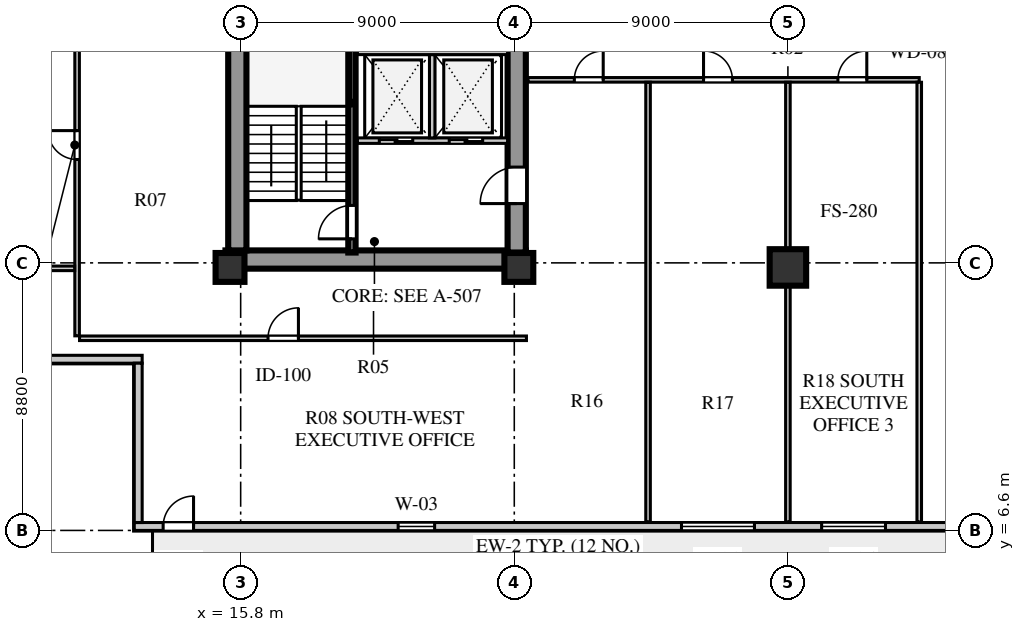
"""IFC4 building model, lengths in metres.
Left out: names, types, materials, properties, quantities, classifications, styles, units other than length and angle.
Written with IfcOpenShell. Run it as: python <this file> out.ifc"""

import sys

from ifc_helpers import new_model, si_unit, direction, frame, frame_2d, origin, origin_2d, place, context, subcontext, project, spatial, rectangle, extrude, element, fill, save


model = new_model("IFC4")
c1 = context("Model", 3, precision=1e-05, world=origin(), true_north=direction((0.0, 1.0)))
c2 = subcontext(c1, "Body", "Model", "MODEL_VIEW")
j1 = project(units=[si_unit("LENGTHUNIT", "METRE"), si_unit("PLANEANGLEUNIT", "RADIAN")], contexts=[c1])
p1 = place(None, origin())
s1 = spatial("IfcSite", under=j1, at=p1, CompositionType="ELEMENT")
p2 = place(p1, origin())
s2 = spatial("IfcBuilding", under=s1, at=p2, CompositionType="ELEMENT")
p3 = place(p2, frame((0.0, 0.0, 50.0)))
s3 = spatial("IfcBuildingStorey", under=s2, at=p3, CompositionType="ELEMENT", Elevation=50.0)
p4 = place(p3, frame((15.3, 15.51, 0.0), z_axis=(0.0, 0.0, 1.0), x_axis=(1.0, 0.0, 0.0)))
e1 = element("IfcWall", 1, at=p4, inside=s3, PredefinedType="SHEAR", context=c2, shape_type="SweptSolid", body=[
    extrude(rectangle(XDim=9.88, YDim=0.6, at=frame_2d((4.94, 0.0))), origin(), (0.0, 0.0, 1.0), 3.72),
])
p5 = place(p3, frame((15.69, 15.81, 0.0), z_axis=(0.0, 0.0, 1.0), x_axis=(0.0, 1.0, 0.0)))
e2 = element("IfcWall", 2, at=p5, inside=s3, PredefinedType="SHEAR", context=c2, shape_type="SweptSolid", body=[
    extrude(rectangle(XDim=25.63, YDim=0.6, at=frame_2d((12.815, 0.0))), origin(), (0.0, 0.0, 1.0), 3.72),
])
p6 = place(p3, frame((24.88, 15.74, 0.0), z_axis=(0.0, 0.0, 1.0), x_axis=(0.0, 1.0, 0.0)))
e3 = element("IfcWall", 3, at=p6, inside=s3, PredefinedType="SHEAR", context=c2, shape_type="SweptSolid", body=[
    extrude(rectangle(XDim=25.76, YDim=0.6, at=frame_2d((12.88, 0.0))), origin(), (0.0, 0.0, 1.0), 3.72),
])
p7 = place(p6, frame((1.61, 0.0, 0.0)))
e4 = element("IfcOpeningElement", 4, at=p7, cuts=e3, PredefinedType="OPENING", context=c2, shape_type="SweptSolid", body=[
    extrude(rectangle(XDim=1.2, YDim=2.1, at=frame_2d((0.6, 1.05))), frame((0.0, 0.31, 0.0), z_axis=(0.0, -1.0, 0.0), x_axis=(1.0, 0.0, 0.0)), (0.0, 0.0, 1.0), 0.62),
])
p8 = place(p6, frame((6.78, 0.0, 0.0)))
e5 = element("IfcOpeningElement", 5, at=p8, cuts=e3, PredefinedType="OPENING", context=c2, shape_type="SweptSolid", body=[
    extrude(rectangle(XDim=0.85, YDim=2.06, at=frame_2d((0.425, 1.03))), frame((0.0, 0.31, 0.0), z_axis=(0.0, -1.0, 0.0), x_axis=(1.0, 0.0, 0.0)), (0.0, 0.0, 1.0), 0.62),
])
p9 = place(p6, frame((12.11, 0.0, 0.0)))
e6 = element("IfcOpeningElement", 6, at=p9, cuts=e3, PredefinedType="OPENING", context=c2, shape_type="SweptSolid", body=[
    extrude(rectangle(XDim=1.5, YDim=2.12, at=frame_2d((0.75, 1.06))), frame((0.0, 0.31, 0.0), z_axis=(0.0, -1.0, 0.0), x_axis=(1.0, 0.0, 0.0)), (0.0, 0.0, 1.0), 0.62),
])
p10 = place(p6, frame((20.11, 0.0, 0.0)))
e7 = element("IfcOpeningElement", 7, at=p10, cuts=e3, PredefinedType="OPENING", context=c2, shape_type="SweptSolid", body=[
    extrude(rectangle(XDim=1.2, YDim=2.12, at=frame_2d((0.6, 1.06))), frame((0.0, 0.31, 0.0), z_axis=(0.0, -1.0, 0.0), x_axis=(1.0, 0.0, 0.0)), (0.0, 0.0, 1.0), 0.62),
])
p11 = place(p6, frame((24.01, 0.0, 0.0)))
e8 = element("IfcOpeningElement", 8, at=p11, cuts=e3, PredefinedType="OPENING", context=c2, shape_type="SweptSolid", body=[
    extrude(rectangle(XDim=0.95, YDim=2.1, at=frame_2d((0.475, 1.05))), frame((0.0, 0.31, 0.0), z_axis=(0.0, -1.0, 0.0), x_axis=(1.0, 0.0, 0.0)), (0.0, 0.0, 1.0), 0.62),
])
for number, where, z_axis, x_axis in (
    (9, (15.45, 15.25, 0.0), (0.0, 0.0, 1.0), (1.0, 0.0, 0.0)),
    (10, (24.95, 15.25, 0.0), (0.0, 0.0, 1.0), (1.0, 0.0, 0.0)),
):
    element("IfcColumn", number, at=place(p3, frame(where, z_axis=z_axis, x_axis=x_axis)), inside=s3, PredefinedType="COLUMN", context=c2, shape_type="SweptSolid", body=[
        extrude(rectangle(XDim=0.95, YDim=0.95, at=origin_2d()), origin(), (0.0, 0.0, 1.0), 3.72),
    ])
p12 = place(p3, frame((33.8, 15.25, 0.0), z_axis=(0.0, 0.0, 1.0), x_axis=(1.0, 0.0, 0.0)))
e11 = element("IfcColumn", 11, at=p12, inside=s3, PredefinedType="COLUMN", context=c2, shape_type="SweptSolid", body=[
    extrude(rectangle(XDim=1.2, YDim=1.2, at=origin_2d()), origin(), (0.0, 0.0, 1.0), 3.72),
])
p13 = place(p3, frame((12.3, 6.73, 0.0), z_axis=(0.0, 0.0, 1.0), x_axis=(1.0, 0.0, 0.0)))
e12 = element("IfcWall", 12, at=p13, inside=s3, PredefinedType="SOLIDWALL", context=c2, shape_type="SweptSolid", body=[
    extrude(rectangle(XDim=34.0, YDim=0.26, at=frame_2d((17.0, 0.0))), origin(), (0.0, 0.0, 1.0), 3.72),
])
p14 = place(p13, frame((0.95, 0.0, 0.0)))
e13 = element("IfcOpeningElement", 13, at=p14, cuts=e12, PredefinedType="OPENING", context=c2, shape_type="SweptSolid", body=[
    extrude(rectangle(XDim=1.0, YDim=2.05, at=frame_2d((0.5, 1.025))), frame((0.0, 0.14, 0.0), z_axis=(0.0, -1.0, 0.0), x_axis=(1.0, 0.0, 0.0)), (0.0, 0.0, 1.0), 0.28),
])
p15 = place(p13, frame((8.68, 0.0, 0.8)))
e14 = element("IfcOpeningElement", 14, at=p15, cuts=e12, PredefinedType="OPENING", context=c2, shape_type="SweptSolid", body=[
    extrude(rectangle(XDim=1.2, YDim=1.75, at=frame_2d((0.6, 0.875))), frame((0.0, 0.14, 0.0), z_axis=(0.0, -1.0, 0.0), x_axis=(1.0, 0.0, 0.0)), (0.0, 0.0, 1.0), 0.28),
])
p16 = place(p13, frame((18.0, 0.0, 0.8)))
e15 = element("IfcOpeningElement", 15, at=p16, cuts=e12, PredefinedType="OPENING", context=c2, shape_type="SweptSolid", body=[
    extrude(rectangle(XDim=2.4, YDim=2.05, at=frame_2d((1.2, 1.025))), frame((0.0, 0.14, 0.0), z_axis=(0.0, -1.0, 0.0), x_axis=(1.0, 0.0, 0.0)), (0.0, 0.0, 1.0), 0.28),
])
p17 = place(p13, frame((22.61, 0.0, 0.8)))
e16 = element("IfcOpeningElement", 16, at=p17, cuts=e12, PredefinedType="OPENING", context=c2, shape_type="SweptSolid", body=[
    extrude(rectangle(XDim=2.1, YDim=1.95, at=frame_2d((1.05, 0.975))), frame((0.0, 0.14, 0.0), z_axis=(0.0, -1.0, 0.0), x_axis=(1.0, 0.0, 0.0)), (0.0, 0.0, 1.0), 0.28),
])
p18 = place(p13, frame((29.18, 0.0, 0.8)))
e17 = element("IfcOpeningElement", 17, at=p18, cuts=e12, PredefinedType="OPENING", context=c2, shape_type="SweptSolid", body=[
    extrude(rectangle(XDim=1.35, YDim=1.9, at=frame_2d((0.675, 0.95))), frame((0.0, 0.14, 0.0), z_axis=(0.0, -1.0, 0.0), x_axis=(1.0, 0.0, 0.0)), (0.0, 0.0, 1.0), 0.28),
])
p19 = place(p3, frame((6.8, 12.23, 0.0), z_axis=(0.0, 0.0, 1.0), x_axis=(1.0, 0.0, 0.0)))
e18 = element("IfcWall", 18, at=p19, inside=s3, PredefinedType="SOLIDWALL", context=c2, shape_type="SweptSolid", body=[
    extrude(rectangle(XDim=5.76, YDim=0.26, at=frame_2d((2.88, 0.0))), origin(), (0.0, 0.0, 1.0), 3.72),
])
p20 = place(p3, frame((12.43, 12.1, 0.0), z_axis=(0.0, 0.0, 1.0), x_axis=(0.0, -1.0, 0.0)))
e19 = element("IfcWall", 19, at=p20, inside=s3, PredefinedType="SOLIDWALL", context=c2, shape_type="SweptSolid", body=[
    extrude(rectangle(XDim=5.24, YDim=0.26, at=frame_2d((2.62, 0.0))), origin(), (0.0, 0.0, 1.0), 3.72),
])
p21 = place(p3, frame((19.46, 15.74, 0.0), z_axis=(0.0, 0.0, 1.0), x_axis=(0.0, 1.0, 0.0)))
e20 = element("IfcWall", 20, at=p21, inside=s3, PredefinedType="SHEAR", context=c2, shape_type="SweptSolid", body=[
    extrude(rectangle(XDim=8.2, YDim=0.24, at=frame_2d((4.1, 0.0))), origin(), (0.0, 0.0, 1.0), 4.0),
])
p22 = place(p21, frame((0.45, 0.0, 0.0)))
e21 = element("IfcOpeningElement", 21, at=p22, cuts=e20, PredefinedType="OPENING", context=c2, shape_type="SweptSolid", body=[
    extrude(rectangle(XDim=1.1, YDim=2.1, at=frame_2d((0.55, 1.05))), frame((0.0, 0.13, 0.0), z_axis=(0.0, -1.0, 0.0), x_axis=(1.0, 0.0, 0.0)), (0.0, 0.0, 1.0), 0.26),
])
p23 = place(p3, frame((19.64, 19.42, 0.0), z_axis=(0.0, 0.0, 1.0), x_axis=(1.0, 0.0, 0.0)))
e22 = element("IfcWall", 22, at=p23, inside=s3, PredefinedType="SOLIDWALL", context=c2, shape_type="SweptSolid", body=[
    extrude(rectangle(XDim=4.94, YDim=0.18, at=frame_2d((2.47, 0.0))), origin(), (0.0, 0.0, 1.0), 3.72),
])
p24 = place(p23, frame((0.72, 0.0, 0.0)))
e23 = element("IfcOpeningElement", 23, at=p24, cuts=e22, PredefinedType="OPENING", context=c2, shape_type="SweptSolid", body=[
    extrude(rectangle(XDim=1.1, YDim=2.1, at=frame_2d((0.55, 1.05))), frame((0.0, 0.1, 0.0), z_axis=(0.0, -1.0, 0.0), x_axis=(1.0, 0.0, 0.0)), (0.0, 0.0, 1.0), 0.2),
])
p25 = place(p23, frame((3.02, 0.0, 0.0)))
e24 = element("IfcOpeningElement", 24, at=p25, cuts=e22, PredefinedType="OPENING", context=c2, shape_type="SweptSolid", body=[
    extrude(rectangle(XDim=1.1, YDim=2.1, at=frame_2d((0.55, 1.05))), frame((0.0, 0.1, 0.0), z_axis=(0.0, -1.0, 0.0), x_axis=(1.0, 0.0, 0.0)), (0.0, 0.0, 1.0), 0.2),
])
p26 = place(p3, frame((22.1, 19.51, 0.0), z_axis=(0.0, 0.0, 1.0), x_axis=(0.0, 1.0, 0.0)))
e25 = element("IfcWall", 25, at=p26, inside=s3, PredefinedType="SOLIDWALL", context=c2, shape_type="SweptSolid", body=[
    extrude(rectangle(XDim=2.74, YDim=0.18, at=frame_2d((1.37, 0.0))), origin(), (0.0, 0.0, 1.0), 3.72),
])
p27 = place(p3, frame((19.64, 22.34, 0.0), z_axis=(0.0, 0.0, 1.0), x_axis=(1.0, 0.0, 0.0)))
e26 = element("IfcWall", 26, at=p27, inside=s3, PredefinedType="SOLIDWALL", context=c2, shape_type="SweptSolid", body=[
    extrude(rectangle(XDim=4.94, YDim=0.18, at=frame_2d((2.47, 0.0))), origin(), (0.0, 0.0, 1.0), 3.72),
])
p28 = place(p3, frame((25.25, 21.42, 0.0), z_axis=(0.0, 0.0, 1.0), x_axis=(1.0, 0.0, 0.0)))
e27 = element("IfcWall", 27, at=p28, inside=s3, PredefinedType="PARTITIONING", context=c2, shape_type="SweptSolid", body=[
    extrude(rectangle(XDim=12.87, YDim=0.15, at=frame_2d((6.435, 0.0))), origin(), (0.0, 0.0, 1.0), 3.32),
])
p29 = place(p28, frame((1.525, 0.0, 0.0)))
e28 = element("IfcOpeningElement", 28, at=p29, cuts=e27, PredefinedType="OPENING", context=c2, shape_type="SweptSolid", body=[
    extrude(rectangle(XDim=0.95, YDim=2.08, at=frame_2d((0.475, 1.04))), frame((0.0, 0.085, 0.0), z_axis=(0.0, -1.0, 0.0), x_axis=(1.0, 0.0, 0.0)), (0.0, 0.0, 1.0), 0.17),
])
p30 = place(p28, frame((5.775, 0.0, 0.0)))
e29 = element("IfcOpeningElement", 29, at=p30, cuts=e27, PredefinedType="OPENING", context=c2, shape_type="SweptSolid", body=[
    extrude(rectangle(XDim=0.95, YDim=2.08, at=frame_2d((0.475, 1.04))), frame((0.0, 0.085, 0.0), z_axis=(0.0, -1.0, 0.0), x_axis=(1.0, 0.0, 0.0)), (0.0, 0.0, 1.0), 0.17),
])
p31 = place(p28, frame((10.195, 0.0, 0.0)))
e30 = element("IfcOpeningElement", 30, at=p31, cuts=e27, PredefinedType="OPENING", context=c2, shape_type="SweptSolid", body=[
    extrude(rectangle(XDim=0.95, YDim=2.08, at=frame_2d((0.475, 1.04))), frame((0.0, 0.085, 0.0), z_axis=(0.0, -1.0, 0.0), x_axis=(1.0, 0.0, 0.0)), (0.0, 0.0, 1.0), 0.17),
])
p32 = place(p3, frame((38.12, 6.88, 0.0), z_axis=(0.0, 0.0, 1.0), x_axis=(0.0, 1.0, 0.0)))
e31 = element("IfcWall", 31, at=p32, inside=s3, PredefinedType="PARTITIONING", context=c2, shape_type="SweptSolid", body=[
    extrude(rectangle(XDim=14.46, YDim=0.15, at=frame_2d((7.23, 0.0))), origin(), (0.0, 0.0, 1.0), 3.72),
])
p33 = place(p3, frame((10.42, 13.0, 0.0), z_axis=(0.0, 0.0, 1.0), x_axis=(0.0, 1.0, 0.0)))
e32 = element("IfcWall", 32, at=p33, inside=s3, PredefinedType="PARTITIONING", context=c2, shape_type="SweptSolid", body=[
    extrude(rectangle(XDim=31.2, YDim=0.15, at=frame_2d((15.6, 0.0))), origin(), (0.0, 0.0, 1.0), 3.72),
])
p34 = place(p33, frame((5.8, 0.0, 0.0)))
e33 = element("IfcOpeningElement", 33, at=p34, cuts=e32, PredefinedType="OPENING", context=c2, shape_type="SweptSolid", body=[
    extrude(rectangle(XDim=0.95, YDim=2.08, at=frame_2d((0.475, 1.04))), frame((0.0, 0.085, 0.0), z_axis=(0.0, -1.0, 0.0), x_axis=(1.0, 0.0, 0.0)), (0.0, 0.0, 1.0), 0.17),
])
p35 = place(p33, frame((15.05, 0.0, 0.0)))
e34 = element("IfcOpeningElement", 34, at=p35, cuts=e32, PredefinedType="OPENING", context=c2, shape_type="SweptSolid", body=[
    extrude(rectangle(XDim=0.95, YDim=2.08, at=frame_2d((0.475, 1.04))), frame((0.0, 0.085, 0.0), z_axis=(0.0, -1.0, 0.0), x_axis=(1.0, 0.0, 0.0)), (0.0, 0.0, 1.0), 0.17),
])
p36 = place(p33, frame((24.4, 0.0, 0.0)))
e35 = element("IfcOpeningElement", 35, at=p36, cuts=e32, PredefinedType="OPENING", context=c2, shape_type="SweptSolid", body=[
    extrude(rectangle(XDim=0.95, YDim=2.08, at=frame_2d((0.475, 1.04))), frame((0.0, 0.085, 0.0), z_axis=(0.0, -1.0, 0.0), x_axis=(1.0, 0.0, 0.0)), (0.0, 0.0, 1.0), 0.17),
])
p37 = place(p3, frame((7.08, 15.22, 0.0), z_axis=(0.0, 0.0, 1.0), x_axis=(1.0, 0.0, 0.0)))
e36 = element("IfcWall", 36, at=p37, inside=s3, PredefinedType="PARTITIONING", context=c2, shape_type="SweptSolid", body=[
    extrude(rectangle(XDim=3.26, YDim=0.15, at=frame_2d((1.63, 0.0))), origin(), (0.0, 0.0, 1.0), 3.22),
])
p38 = place(p3, frame((10.5, 12.92, 0.0), z_axis=(0.0, 0.0, 1.0), x_axis=(1.0, 0.0, 0.0)))
e37 = element("IfcWall", 37, at=p38, inside=s3, PredefinedType="PARTITIONING", context=c2, shape_type="SweptSolid", body=[
    extrude(rectangle(XDim=14.7, YDim=0.15, at=frame_2d((7.35, 0.0))), origin(), (0.0, 0.0, 1.0), 3.72),
])
p39 = place(p38, frame((6.2, 0.0, 0.0)))
e38 = element("IfcOpeningElement", 38, at=p39, cuts=e37, PredefinedType="OPENING", context=c2, shape_type="SweptSolid", body=[
    extrude(rectangle(XDim=1.0, YDim=2.08, at=frame_2d((0.5, 1.04))), frame((0.0, 0.085, 0.0), z_axis=(0.0, -1.0, 0.0), x_axis=(1.0, 0.0, 0.0)), (0.0, 0.0, 1.0), 0.17),
])
p40 = place(p3, frame((29.2, 6.88, 0.0), z_axis=(0.0, 0.0, 1.0), x_axis=(0.0, 1.0, 0.0)))
e39 = element("IfcWall", 39, at=p40, inside=s3, PredefinedType="PARTITIONING", context=c2, shape_type="SweptSolid", body=[
    extrude(rectangle(XDim=14.46, YDim=0.15, at=frame_2d((7.23, 0.0))), origin(), (0.0, 0.0, 1.0), 3.72),
])
p41 = place(p3, frame((33.8, 6.88, 0.0), z_axis=(0.0, 0.0, 1.0), x_axis=(0.0, 1.0, 0.0)))
e40 = element("IfcWall", 40, at=p41, inside=s3, PredefinedType="PARTITIONING", context=c2, shape_type="SweptSolid", body=[
    extrude(rectangle(XDim=14.46, YDim=0.15, at=frame_2d((7.23, 0.0))), origin(), (0.0, 0.0, 1.0), 3.02),
])
p42 = place(p14, frame((1.0, 0.0, 0.0), z_axis=(0.0, 0.0, 1.0), x_axis=(-1.0, 0.0, 0.0)))
e41 = element("IfcDoor", 41, at=p42, inside=s3, OperationType="SINGLE_SWING_LEFT", PredefinedType="DOOR", context=c2, shape_type="SweptSolid", body=[
    extrude(rectangle(XDim=1.0, YDim=2.05, at=frame_2d((0.5, 1.025))), frame((0.0, 0.025, 0.0), z_axis=(0.0, -1.0, 0.0), x_axis=(1.0, 0.0, 0.0)), (0.0, 0.0, 1.0), 0.05),
])
fill(e13, e41)
p43 = place(p15, origin())
e42 = element("IfcWindow", 42, at=p43, inside=s3, PartitioningType="SINGLE_PANEL", PredefinedType="WINDOW", context=c2, shape_type="SweptSolid", body=[
    extrude(rectangle(XDim=1.2, YDim=1.75, at=frame_2d((0.6, 0.875))), frame((0.0, 0.03, 0.0), z_axis=(0.0, -1.0, 0.0), x_axis=(1.0, 0.0, 0.0)), (0.0, 0.0, 1.0), 0.06),
])
fill(e14, e42)
p44 = place(p16, origin())
e43 = element("IfcWindow", 43, at=p44, inside=s3, PartitioningType="SINGLE_PANEL", PredefinedType="WINDOW", context=c2, shape_type="SweptSolid", body=[
    extrude(rectangle(XDim=2.4, YDim=2.05, at=frame_2d((1.2, 1.025))), frame((0.0, 0.03, 0.0), z_axis=(0.0, -1.0, 0.0), x_axis=(1.0, 0.0, 0.0)), (0.0, 0.0, 1.0), 0.06),
])
fill(e15, e43)
p45 = place(p17, origin())
e44 = element("IfcWindow", 44, at=p45, inside=s3, PartitioningType="SINGLE_PANEL", PredefinedType="WINDOW", context=c2, shape_type="SweptSolid", body=[
    extrude(rectangle(XDim=2.1, YDim=1.95, at=frame_2d((1.05, 0.975))), frame((0.0, 0.03, 0.0), z_axis=(0.0, -1.0, 0.0), x_axis=(1.0, 0.0, 0.0)), (0.0, 0.0, 1.0), 0.06),
])
fill(e16, e44)
p46 = place(p22, origin())
e45 = element("IfcDoor", 45, at=p46, inside=s3, OperationType="SINGLE_SWING_LEFT", PredefinedType="DOOR", context=c2, shape_type="SweptSolid", body=[
    extrude(rectangle(XDim=1.1, YDim=2.1, at=frame_2d((0.55, 1.05))), frame((0.0, 0.025, 0.0), z_axis=(0.0, -1.0, 0.0), x_axis=(1.0, 0.0, 0.0)), (0.0, 0.0, 1.0), 0.05),
])
fill(e21, e45)
p47 = place(p24, origin())
e46 = element("IfcDoor", 46, at=p47, inside=s3, OperationType="DOUBLE_DOOR_SLIDING", PredefinedType="DOOR", context=c2, shape_type="SweptSolid", body=[
    extrude(rectangle(XDim=1.1, YDim=2.1, at=frame_2d((0.55, 1.05))), frame((0.0, 0.025, 0.0), z_axis=(0.0, -1.0, 0.0), x_axis=(1.0, 0.0, 0.0)), (0.0, 0.0, 1.0), 0.05),
])
fill(e23, e46)
p48 = place(p25, origin())
e47 = element("IfcDoor", 47, at=p48, inside=s3, OperationType="DOUBLE_DOOR_SLIDING", PredefinedType="DOOR", context=c2, shape_type="SweptSolid", body=[
    extrude(rectangle(XDim=1.1, YDim=2.1, at=frame_2d((0.55, 1.05))), frame((0.0, 0.025, 0.0), z_axis=(0.0, -1.0, 0.0), x_axis=(1.0, 0.0, 0.0)), (0.0, 0.0, 1.0), 0.05),
])
fill(e24, e47)
p49 = place(p7, frame((1.2, 0.0, 0.0), z_axis=(0.0, 0.0, 1.0), x_axis=(-1.0, 0.0, 0.0)))
e48 = element("IfcDoor", 48, at=p49, inside=s3, OperationType="SINGLE_SWING_RIGHT", PredefinedType="DOOR", context=c2, shape_type="SweptSolid", body=[
    extrude(rectangle(XDim=1.2, YDim=2.1, at=frame_2d((0.6, 1.05))), frame((0.0, 0.025, 0.0), z_axis=(0.0, -1.0, 0.0), x_axis=(1.0, 0.0, 0.0)), (0.0, 0.0, 1.0), 0.05),
])
fill(e4, e48)
p50 = place(p39, frame((1.0, 0.0, 0.0), z_axis=(0.0, 0.0, 1.0), x_axis=(-1.0, 0.0, 0.0)))
e49 = element("IfcDoor", 49, at=p50, inside=s3, OperationType="SINGLE_SWING_LEFT", PredefinedType="DOOR", context=c2, shape_type="SweptSolid", body=[
    extrude(rectangle(XDim=1.0, YDim=2.08, at=frame_2d((0.5, 1.04))), frame((0.0, 0.025, 0.0), z_axis=(0.0, -1.0, 0.0), x_axis=(1.0, 0.0, 0.0)), (0.0, 0.0, 1.0), 0.05),
])
fill(e38, e49)
p51 = place(p34, frame((0.95, 0.0, 0.0), z_axis=(0.0, 0.0, 1.0), x_axis=(-1.0, 0.0, 0.0)))
e50 = element("IfcDoor", 50, at=p51, inside=s3, OperationType="SINGLE_SWING_LEFT", PredefinedType="DOOR", context=c2, shape_type="SweptSolid", body=[
    extrude(rectangle(XDim=0.95, YDim=2.08, at=frame_2d((0.475, 1.04))), frame((0.0, 0.025, 0.0), z_axis=(0.0, -1.0, 0.0), x_axis=(1.0, 0.0, 0.0)), (0.0, 0.0, 1.0), 0.05),
])
fill(e33, e50)
p52 = place(p29, frame((0.95, 0.0, 0.0), z_axis=(0.0, 0.0, 1.0), x_axis=(-1.0, 0.0, 0.0)))
e51 = element("IfcDoor", 51, at=p52, inside=s3, OperationType="SINGLE_SWING_LEFT", PredefinedType="DOOR", context=c2, shape_type="SweptSolid", body=[
    extrude(rectangle(XDim=0.95, YDim=2.08, at=frame_2d((0.475, 1.04))), frame((0.0, 0.025, 0.0), z_axis=(0.0, -1.0, 0.0), x_axis=(1.0, 0.0, 0.0)), (0.0, 0.0, 1.0), 0.05),
])
fill(e28, e51)
p53 = place(p30, frame((0.95, 0.0, 0.0), z_axis=(0.0, 0.0, 1.0), x_axis=(-1.0, 0.0, 0.0)))
e52 = element("IfcDoor", 52, at=p53, inside=s3, OperationType="SINGLE_SWING_RIGHT", PredefinedType="DOOR", context=c2, shape_type="SweptSolid", body=[
    extrude(rectangle(XDim=0.95, YDim=2.08, at=frame_2d((0.475, 1.04))), frame((0.0, 0.025, 0.0), z_axis=(0.0, -1.0, 0.0), x_axis=(1.0, 0.0, 0.0)), (0.0, 0.0, 1.0), 0.05),
])
fill(e29, e52)
p54 = place(p31, frame((0.95, 0.0, 0.0), z_axis=(0.0, 0.0, 1.0), x_axis=(-1.0, 0.0, 0.0)))
e53 = element("IfcDoor", 53, at=p54, inside=s3, OperationType="SINGLE_SWING_LEFT", PredefinedType="DOOR", context=c2, shape_type="SweptSolid", body=[
    extrude(rectangle(XDim=0.95, YDim=2.08, at=frame_2d((0.475, 1.04))), frame((0.0, 0.025, 0.0), z_axis=(0.0, -1.0, 0.0), x_axis=(1.0, 0.0, 0.0)), (0.0, 0.0, 1.0), 0.05),
])
fill(e30, e53)
save(model, sys.argv[1])
